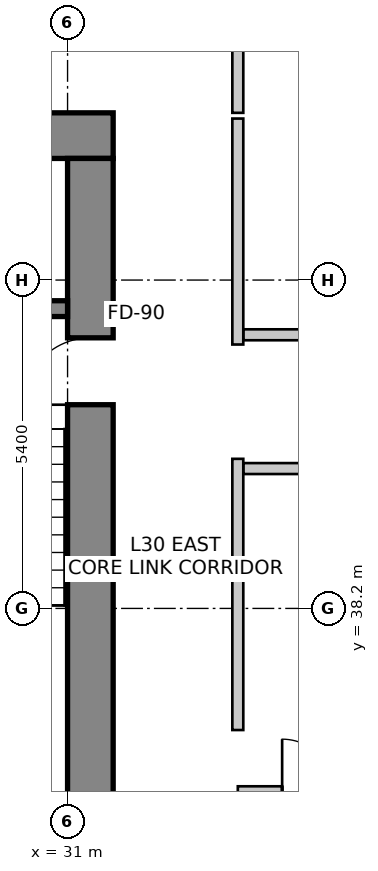
"""IFC4 building model, lengths in metres.
Left out: names, types, materials, properties, quantities, classifications, styles, units other than length and angle.
Written with IfcOpenShell. Run it as: python <this file> out.ifc"""

import sys

from ifc_helpers import new_model, si_unit, direction, frame, frame_2d, origin, place, context, subcontext, project, spatial, rectangle, extrude, source, transform, mapped, element, fill, save


model = new_model("IFC4")
c1 = context("Model", 3, precision=1e-05, world=origin(), true_north=direction((0.0, 1.0)))
c2 = subcontext(c1, "Body", "Model", "MODEL_VIEW")
j1 = project(units=[si_unit("LENGTHUNIT", "METRE"), si_unit("PLANEANGLEUNIT", "RADIAN")], contexts=[c1])
p1 = place(None, origin())
s1 = spatial("IfcSite", under=j1, at=p1, CompositionType="ELEMENT")
p2 = place(p1, origin())
s2 = spatial("IfcBuilding", under=s1, at=p2, CompositionType="ELEMENT")
p3 = place(p2, frame((0.0, 0.0, 125.0)))
s3 = spatial("IfcBuildingStorey", under=s2, at=p3, CompositionType="ELEMENT", Elevation=125.0)
p4 = place(p3, frame((15.85, 45.975, 0.0), z_axis=(0.0, 0.0, 1.0), x_axis=(1.0, 0.0, 0.0)))
e1 = element("IfcWall", 1, at=p4, inside=s3, PredefinedType="SHEAR", context=c2, shape_type="SweptSolid", body=[
    extrude(rectangle(XDim=15.9, YDim=0.75, at=frame_2d((7.95, 0.0))), origin(), (0.0, 0.0, 1.0), 3.6),
])
p5 = place(p3, frame((31.375, 34.2, 0.0), z_axis=(0.0, 0.0, 1.0), x_axis=(0.0, 1.0, 0.0)))
e2 = element("IfcWall", 2, at=p5, inside=s3, PredefinedType="SHEAR", context=c2, shape_type="SweptSolid", body=[
    extrude(rectangle(XDim=11.4, YDim=0.75, at=frame_2d((5.7, 0.0))), origin(), (0.0, 0.0, 1.0), 3.6),
])
m1 = source(origin(), c2, "Body", "SweptSolid", [
    extrude(rectangle(XDim=1.1, YDim=2.15, at=frame_2d((0.55, 1.075))), frame((0.0, 0.385, 0.0), z_axis=(0.0, -1.0, 0.0), x_axis=(1.0, 0.0, 0.0)), (0.0, 0.0, 1.0), 0.77),
])
p6 = place(p5, frame((7.35, 0.0, 0.0)))
e3 = element("IfcOpeningElement", 3, at=p6, cuts=e2, PredefinedType="OPENING", context=c2, shape_type="MappedRepresentation", body=[
    mapped(m1, transform((0.0, 0.0, 0.0), scale=1.0)),
])
p7 = place(p3, frame((27.5, 43.13, 0.0), z_axis=(0.0, 0.0, 1.0), x_axis=(1.0, 0.0, 0.0)))
e4 = element("IfcWall", 4, at=p7, inside=s3, PredefinedType="SHEAR", context=c2, shape_type="SweptSolid", body=[
    extrude(rectangle(XDim=3.5, YDim=0.26, at=frame_2d((1.75, 0.0))), origin(), (0.0, 0.0, 1.0), 3.6),
])
p8 = place(p3, frame((53.561, 47.48, 0.0), z_axis=(0.0, 0.0, 1.0), x_axis=(-0.985845173895, 0.167658262868, 0.0)))
e5 = element("IfcWall", 5, at=p8, inside=s3, PredefinedType="SOLIDWALL", context=c2, shape_type="SweptSolid", body=[
    extrude(rectangle(XDim=32.132, YDim=0.3, at=frame_2d((16.066, 0.0))), origin(), (0.0, 0.0, 1.0), 3.35),
])
m2 = source(origin(), c2, "Body", "SweptSolid", [
    extrude(rectangle(XDim=2.4, YDim=2.2, at=frame_2d((1.2, 1.1))), frame((0.0, 0.16, 0.0), z_axis=(0.0, -1.0, 0.0), x_axis=(1.0, 0.0, 0.0)), (0.0, 0.0, 1.0), 0.32),
])
p9 = place(p8, frame((0.882, 0.0, 0.85)))
e6 = element("IfcOpeningElement", 6, at=p9, cuts=e5, PredefinedType="OPENING", context=c2, shape_type="MappedRepresentation", body=[
    mapped(m2, transform((0.0, 0.0, 0.0), scale=1.0)),
])
p10 = place(p8, frame((6.686, 0.0, 0.85)))
e7 = element("IfcOpeningElement", 7, at=p10, cuts=e5, PredefinedType="OPENING", context=c2, shape_type="MappedRepresentation", body=[
    mapped(m2, transform((0.0, 0.0, 0.0), scale=1.0)),
])
p11 = place(p8, frame((13.449, 0.0, 0.85)))
e8 = element("IfcOpeningElement", 8, at=p11, cuts=e5, PredefinedType="OPENING", context=c2, shape_type="MappedRepresentation", body=[
    mapped(m2, transform((0.0, 0.0, 0.0), scale=1.0)),
])
m3 = source(origin(), c2, "Body", "SweptSolid", [
    extrude(rectangle(XDim=1.8, YDim=2.1, at=frame_2d((0.9, 1.05))), frame((0.0, 0.16, 0.0), z_axis=(0.0, -1.0, 0.0), x_axis=(1.0, 0.0, 0.0)), (0.0, 0.0, 1.0), 0.32),
])
p12 = place(p8, frame((17.889, 0.0, 0.85)))
e9 = element("IfcOpeningElement", 9, at=p12, cuts=e5, PredefinedType="OPENING", context=c2, shape_type="MappedRepresentation", body=[
    mapped(m3, transform((0.0, 0.0, 0.0), scale=1.0)),
])
p13 = place(p8, frame((20.309, 0.0, 0.85)))
e10 = element("IfcOpeningElement", 10, at=p13, cuts=e5, PredefinedType="OPENING", context=c2, shape_type="MappedRepresentation", body=[
    mapped(m2, transform((0.0, 0.0, 0.0), scale=1.0)),
])
p14 = place(p8, frame((25.4, 0.0, 0.85)))
e11 = element("IfcOpeningElement", 11, at=p14, cuts=e5, PredefinedType="OPENING", context=c2, shape_type="MappedRepresentation", body=[
    mapped(m2, transform((0.0, 0.0, 0.0), scale=1.0)),
])
m4 = source(origin(), c2, "Body", "SweptSolid", [
    extrude(rectangle(XDim=1.2, YDim=1.6, at=frame_2d((0.6, 0.8))), frame((0.0, 0.16, 0.0), z_axis=(0.0, -1.0, 0.0), x_axis=(1.0, 0.0, 0.0)), (0.0, 0.0, 1.0), 0.32),
])
p15 = place(p8, frame((30.5, 0.0, 0.85)))
e12 = element("IfcOpeningElement", 12, at=p15, cuts=e5, PredefinedType="OPENING", context=c2, shape_type="MappedRepresentation", body=[
    mapped(m4, transform((0.0, 0.0, 0.0), scale=1.0)),
])
p16 = place(p3, frame((33.8, 48.5, 0.0), z_axis=(0.0, 0.0, 1.0), x_axis=(0.0, -1.0, 0.0)))
e13 = element("IfcWall", 13, at=p16, inside=s3, PredefinedType="PARTITIONING", context=c2, shape_type="SweptSolid", body=[
    extrude(rectangle(XDim=2.15, YDim=0.18, at=frame_2d((1.075, 0.0))), origin(), (0.0, 0.0, 1.0), 2.492),
])
p17 = place(p3, frame((33.8, 40.66, 0.0), z_axis=(0.0, 0.0, 1.0), x_axis=(0.0, -1.0, 0.0)))
e14 = element("IfcWall", 14, at=p17, inside=s3, PredefinedType="PARTITIONING", context=c2, shape_type="SweptSolid", body=[
    extrude(rectangle(XDim=4.46, YDim=0.18, at=frame_2d((2.23, 0.0))), origin(), (0.0, 0.0, 1.0), 3.35),
])
p18 = place(p3, frame((33.8, 46.256, 0.0), z_axis=(0.0, 0.0, 1.0), x_axis=(0.0, -1.0, 0.0)))
e15 = element("IfcWall", 15, at=p18, inside=s3, PredefinedType="PARTITIONING", context=c2, shape_type="SweptSolid", body=[
    extrude(rectangle(XDim=3.716, YDim=0.18, at=frame_2d((1.858, 0.0))), origin(), (0.0, 0.0, 1.0), 2.788),
])
p19 = place(p3, frame((39.205, 40.5, 0.0), z_axis=(0.0, 0.0, 1.0), x_axis=(-1.0, 0.0, 0.0)))
e16 = element("IfcWall", 16, at=p19, inside=s3, PredefinedType="PARTITIONING", context=c2, shape_type="SweptSolid", body=[
    extrude(rectangle(XDim=5.311, YDim=0.18, at=frame_2d((2.656, 0.0))), origin(), (0.0, 0.0, 1.0), 2.803),
])
m5 = source(origin(), c2, "Body", "SweptSolid", [
    extrude(rectangle(XDim=0.9, YDim=2.15, at=frame_2d((0.45, 1.075))), frame((0.0, 0.1, 0.0), z_axis=(0.0, -1.0, 0.0), x_axis=(1.0, 0.0, 0.0)), (0.0, 0.0, 1.0), 0.2),
])
p20 = place(p19, frame((2.206, 0.0, 0.0)))
e17 = element("IfcOpeningElement", 17, at=p20, cuts=e16, PredefinedType="OPENING", context=c2, shape_type="MappedRepresentation", body=[
    mapped(m5, transform((0.0, 0.0, 0.0), scale=1.0)),
])
p21 = place(p3, frame((33.894, 42.7, 0.0), z_axis=(0.0, 0.0, 1.0), x_axis=(1.0, 0.0, 0.0)))
e18 = element("IfcWall", 18, at=p21, inside=s3, PredefinedType="PARTITIONING", context=c2, shape_type="SweptSolid", body=[
    extrude(rectangle(XDim=8.266, YDim=0.18, at=frame_2d((4.133, 0.0))), origin(), (0.0, 0.0, 1.0), 2.788),
])
p22 = place(p21, frame((3.075, 0.0, 0.0)))
e19 = element("IfcOpeningElement", 19, at=p22, cuts=e18, PredefinedType="OPENING", context=c2, shape_type="MappedRepresentation", body=[
    mapped(m5, transform((0.0, 0.0, 0.0), scale=1.0)),
])
p23 = place(p3, frame((33.8, 35.2, 0.0), z_axis=(0.0, 0.0, 1.0), x_axis=(1.0, 0.0, 0.0)))
e20 = element("IfcWall", 20, at=p23, inside=s3, PredefinedType="PARTITIONING", context=c2, shape_type="SweptSolid", body=[
    extrude(rectangle(XDim=2.308, YDim=0.15, at=frame_2d((1.154, 0.0))), origin(), (0.0, 0.0, 1.0), 3.35),
])
m6 = source(origin(), c2, "Body", "SweptSolid", [
    extrude(rectangle(XDim=0.85, YDim=2.15, at=frame_2d((0.425, 1.075))), frame((0.0, 0.085, 0.0), z_axis=(0.0, -1.0, 0.0), x_axis=(1.0, 0.0, 0.0)), (0.0, 0.0, 1.0), 0.17),
])
p24 = place(p23, frame((0.729, 0.0, 0.0)))
e21 = element("IfcOpeningElement", 21, at=p24, cuts=e20, PredefinedType="OPENING", context=c2, shape_type="MappedRepresentation", body=[
    mapped(m6, transform((0.0, 0.0, 0.0), scale=1.0)),
])
m7 = source(origin(), c2, "Body", "SweptSolid", [
    extrude(rectangle(XDim=1.1, YDim=2.15, at=frame_2d((0.55, 1.075))), frame((0.0, 0.025, 0.0), z_axis=(0.0, -1.0, 0.0), x_axis=(1.0, 0.0, 0.0)), (0.0, 0.0, 1.0), 0.05),
])
p25 = place(p6, origin())
e22 = element("IfcDoor", 22, at=p25, inside=s3, OperationType="SINGLE_SWING_LEFT", PredefinedType="DOOR", context=c2, shape_type="MappedRepresentation", body=[
    mapped(m7, transform((0.0, 0.0, 0.0), scale=1.0)),
])
fill(e3, e22)
m8 = source(origin(), c2, "Body", "SweptSolid", [
    extrude(rectangle(XDim=0.85, YDim=2.15, at=frame_2d((0.425, 1.075))), frame((0.0, 0.025, 0.0), z_axis=(0.0, -1.0, 0.0), x_axis=(1.0, 0.0, 0.0)), (0.0, 0.0, 1.0), 0.05),
])
p26 = place(p24, origin())
e23 = element("IfcDoor", 23, at=p26, inside=s3, OperationType="SINGLE_SWING_LEFT", PredefinedType="DOOR", context=c2, shape_type="MappedRepresentation", body=[
    mapped(m8, transform((0.0, 0.0, 0.0), scale=1.0)),
])
fill(e21, e23)
save(model, sys.argv[1])
